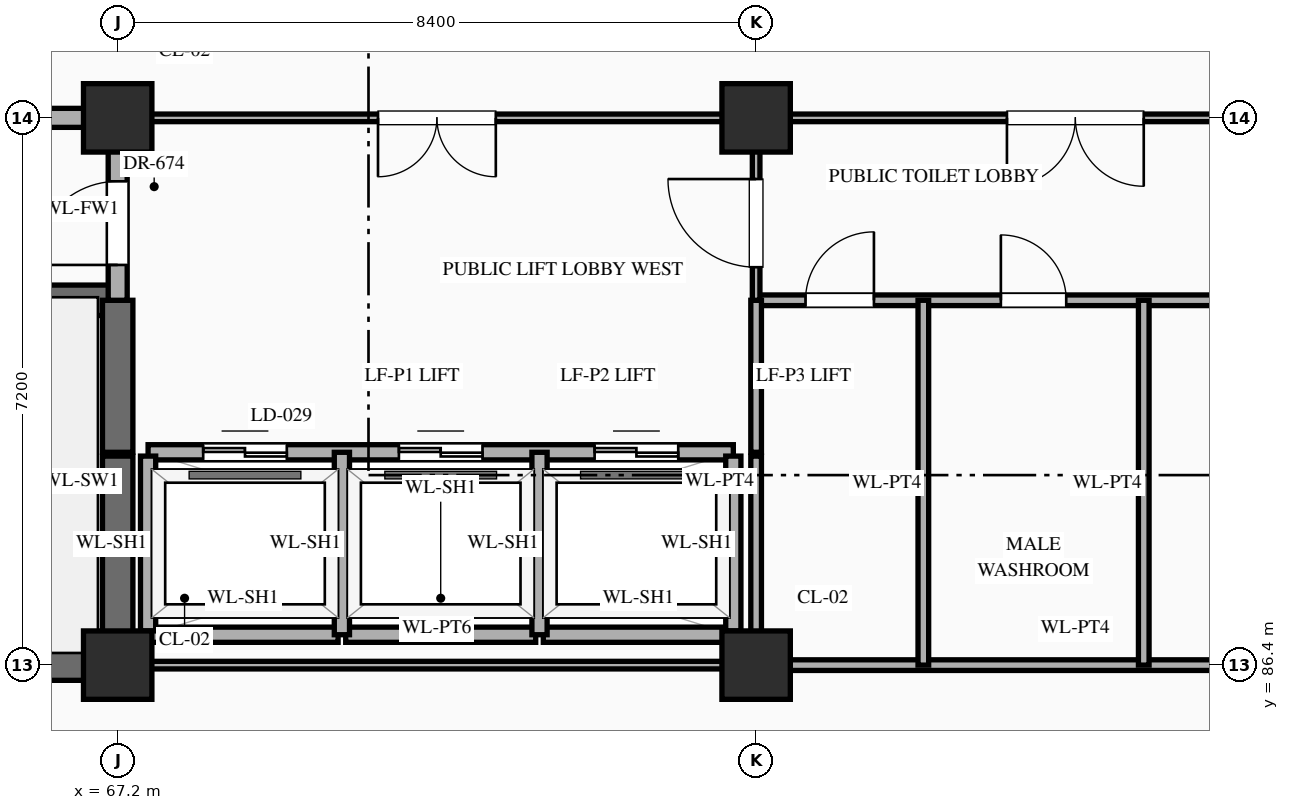
"""IFC4 building model, lengths in metres.
Left out: names, types, materials, properties, quantities, classifications, styles, units other than length and angle.
Written with IfcOpenShell. Run it as: python <this file> out.ifc"""

import sys

from ifc_helpers import new_model, si_unit, direction, frame, frame_2d, origin, origin_2d, place, context, subcontext, project, spatial, rectangle, extrude, element, fill, save


model = new_model("IFC4")
c1 = context("Model", 3, precision=1e-05, world=origin(), true_north=direction((0.0, 1.0)))
c2 = subcontext(c1, "Body", "Model", "MODEL_VIEW")
j1 = project(units=[si_unit("LENGTHUNIT", "METRE"), si_unit("PLANEANGLEUNIT", "RADIAN")], contexts=[c1])
p1 = place(None, origin())
s1 = spatial("IfcSite", under=j1, at=p1, CompositionType="ELEMENT")
p2 = place(p1, origin())
s2 = spatial("IfcBuilding", under=s1, at=p2, CompositionType="ELEMENT")
p3 = place(p2, origin())
s3 = spatial("IfcBuildingStorey", under=s2, at=p3, CompositionType="ELEMENT", Elevation=0.0)
for number, where, z_axis, x_axis in (
    (1, (67.2, 86.4, 0.0), (0.0, 0.0, 1.0), (1.0, 0.0, 0.0)),
    (2, (67.2, 93.6, 0.0), (0.0, 0.0, 1.0), (1.0, 0.0, 0.0)),
    (3, (75.6, 86.4, 0.0), (0.0, 0.0, 1.0), (1.0, 0.0, 0.0)),
    (4, (75.6, 93.6, 0.0), (0.0, 0.0, 1.0), (1.0, 0.0, 0.0)),
):
    element("IfcColumn", number, at=place(p3, frame(where, z_axis=z_axis, x_axis=x_axis)), inside=s3, PredefinedType="COLUMN", context=c2, shape_type="SweptSolid", body=[
        extrude(rectangle(XDim=0.9, YDim=0.9, at=origin_2d()), origin(), (0.0, 0.0, 1.0), 5.4),
    ])
p4 = place(p3, frame((58.8, 86.4, 0.0), z_axis=(0.0, 0.0, 1.0), x_axis=(1.0, 0.0, 0.0)))
e5 = element("IfcWall", 5, at=p4, inside=s3, PredefinedType="SHEAR", context=c2, shape_type="SweptSolid", body=[
    extrude(rectangle(XDim=8.4, YDim=0.4, at=frame_2d((4.2, 0.0))), origin(), (0.0, 0.0, 1.0), 5.12),
])
p5 = place(p3, frame((67.25, 86.4, 0.0), z_axis=(0.0, 0.0, 1.0), x_axis=(1.0, 0.0, 0.0)))
e6 = element("IfcWall", 6, at=p5, inside=s3, PredefinedType="STANDARD", context=c2, shape_type="SweptSolid", body=[
    extrude(rectangle(XDim=8.3, YDim=0.1, at=frame_2d((4.15, 0.0))), origin(), (0.0, 0.0, 1.0), 4.27),
])
p6 = place(p3, frame((75.6, 86.4, 0.0), z_axis=(0.0, 0.0, 1.0), x_axis=(1.0, 0.0, 0.0)))
e7 = element("IfcWall", 7, at=p6, inside=s3, PredefinedType="STANDARD", context=c2, shape_type="SweptSolid", body=[
    extrude(rectangle(XDim=8.4, YDim=0.14, at=frame_2d((4.2, 0.0))), origin(), (0.0, 0.0, 1.0), 4.27),
])
for number, where, z_axis, x_axis in (
    (8, (67.6, 86.8, 0.0), (0.0, 0.0, 1.0), (1.0, 0.0, 0.0)),
    (9, (70.2, 86.8, 0.0), (0.0, 0.0, 1.0), (1.0, 0.0, 0.0)),
    (10, (72.8, 86.8, 0.0), (0.0, 0.0, 1.0), (1.0, 0.0, 0.0)),
):
    element("IfcWall", number, at=place(p3, frame(where, z_axis=z_axis, x_axis=x_axis)), inside=s3, PredefinedType="STANDARD", context=c2, shape_type="SweptSolid", body=[
        extrude(rectangle(XDim=2.5, YDim=0.2, at=frame_2d((1.25, 0.0))), origin(), (0.0, 0.0, 1.0), 5.12),
    ])
p7 = place(p3, frame((67.6, 89.2, 0.0), z_axis=(0.0, 0.0, 1.0), x_axis=(1.0, 0.0, 0.0)))
e11 = element("IfcWall", 11, at=p7, inside=s3, PredefinedType="STANDARD", context=c2, shape_type="SweptSolid", body=[
    extrude(rectangle(XDim=7.7, YDim=0.2, at=frame_2d((3.85, 0.0))), origin(), (0.0, 0.0, 1.0), 5.12),
])
p8 = place(p7, frame((0.725, 0.0, 0.0)))
e12 = element("IfcOpeningElement", 12, at=p8, cuts=e11, PredefinedType="OPENING", context=c2, shape_type="SweptSolid", body=[
    extrude(rectangle(XDim=1.1, YDim=2.15, at=frame_2d((0.55, 1.075))), frame((0.0, 0.112, 0.0), z_axis=(0.0, -1.0, 0.0), x_axis=(1.0, 0.0, 0.0)), (0.0, 0.0, 1.0), 0.224),
])
p9 = place(p7, frame((3.3, 0.0, 0.0)))
e13 = element("IfcOpeningElement", 13, at=p9, cuts=e11, PredefinedType="OPENING", context=c2, shape_type="SweptSolid", body=[
    extrude(rectangle(XDim=1.1, YDim=2.15, at=frame_2d((0.55, 1.075))), frame((0.0, 0.112, 0.0), z_axis=(0.0, -1.0, 0.0), x_axis=(1.0, 0.0, 0.0)), (0.0, 0.0, 1.0), 0.224),
])
p10 = place(p7, frame((5.875, 0.0, 0.0)))
e14 = element("IfcOpeningElement", 14, at=p10, cuts=e11, PredefinedType="OPENING", context=c2, shape_type="SweptSolid", body=[
    extrude(rectangle(XDim=1.1, YDim=2.15, at=frame_2d((0.55, 1.075))), frame((0.0, 0.112, 0.0), z_axis=(0.0, -1.0, 0.0), x_axis=(1.0, 0.0, 0.0)), (0.0, 0.0, 1.0), 0.224),
])
p11 = place(p3, frame((58.8, 91.2, 0.0), z_axis=(0.0, 0.0, 1.0), x_axis=(1.0, 0.0, 0.0)))
e15 = element("IfcWall", 15, at=p11, inside=s3, PredefinedType="SHEAR", context=c2, shape_type="SweptSolid", body=[
    extrude(rectangle(XDim=8.4, YDim=0.4, at=frame_2d((4.2, 0.0))), origin(), (0.0, 0.0, 1.0), 5.12),
])
p12 = place(p11, frame((0.65, 0.0, 0.0)))
e16 = element("IfcOpeningElement", 16, at=p12, cuts=e15, PredefinedType="OPENING", context=c2, shape_type="SweptSolid", body=[
    extrude(rectangle(XDim=1.1, YDim=2.2, at=frame_2d((0.55, 1.1))), frame((0.0, 0.212, 0.0), z_axis=(0.0, -1.0, 0.0), x_axis=(1.0, 0.0, 0.0)), (0.0, 0.0, 1.0), 0.424),
])
p13 = place(p3, frame((75.6, 91.2, 0.0), z_axis=(0.0, 0.0, 1.0), x_axis=(1.0, 0.0, 0.0)))
e17 = element("IfcWall", 17, at=p13, inside=s3, PredefinedType="STANDARD", context=c2, shape_type="SweptSolid", body=[
    extrude(rectangle(XDim=8.4, YDim=0.14, at=frame_2d((4.2, 0.0))), origin(), (0.0, 0.0, 1.0), 5.12),
])
p14 = place(p13, frame((0.65, 0.0, 0.0)))
e18 = element("IfcOpeningElement", 18, at=p14, cuts=e17, PredefinedType="OPENING", context=c2, shape_type="SweptSolid", body=[
    extrude(rectangle(XDim=0.9, YDim=2.15, at=frame_2d((0.45, 1.075))), frame((0.0, 0.082, 0.0), z_axis=(0.0, -1.0, 0.0), x_axis=(1.0, 0.0, 0.0)), (0.0, 0.0, 1.0), 0.164),
])
p15 = place(p13, frame((3.22, 0.0, 0.0)))
e19 = element("IfcOpeningElement", 19, at=p15, cuts=e17, PredefinedType="OPENING", context=c2, shape_type="SweptSolid", body=[
    extrude(rectangle(XDim=0.86, YDim=2.1, at=frame_2d((0.43, 1.05))), frame((0.0, 0.082, 0.0), z_axis=(0.0, -1.0, 0.0), x_axis=(1.0, 0.0, 0.0)), (0.0, 0.0, 1.0), 0.164),
])
p16 = place(p13, frame((6.32, 0.0, 0.0)))
e20 = element("IfcOpeningElement", 20, at=p16, cuts=e17, PredefinedType="OPENING", context=c2, shape_type="SweptSolid", body=[
    extrude(rectangle(XDim=0.86, YDim=2.1, at=frame_2d((0.43, 1.05))), frame((0.0, 0.082, 0.0), z_axis=(0.0, -1.0, 0.0), x_axis=(1.0, 0.0, 0.0)), (0.0, 0.0, 1.0), 0.164),
])
p17 = place(p3, frame((42.0, 93.6, 0.0), z_axis=(0.0, 0.0, 1.0), x_axis=(1.0, 0.0, 0.0)))
e21 = element("IfcWall", 21, at=p17, inside=s3, PredefinedType="STANDARD", context=c2, shape_type="SweptSolid", body=[
    extrude(rectangle(XDim=25.2, YDim=0.25, at=frame_2d((12.6, 0.0))), origin(), (0.0, 0.0, 1.0), 4.27),
])
p18 = place(p17, frame((20.2, 0.0, 0.0)))
e22 = element("IfcOpeningElement", 22, at=p18, cuts=e21, PredefinedType="OPENING", context=c2, shape_type="SweptSolid", body=[
    extrude(rectangle(XDim=1.6, YDim=2.3, at=frame_2d((0.8, 1.15))), frame((0.0, 0.137, 0.0), z_axis=(0.0, -1.0, 0.0), x_axis=(1.0, 0.0, 0.0)), (0.0, 0.0, 1.0), 0.274),
])
p19 = place(p17, frame((3.288, 0.0, 0.0)))
e23 = element("IfcOpeningElement", 23, at=p19, cuts=e21, PredefinedType="OPENING", context=c2, shape_type="SweptSolid", body=[
    extrude(rectangle(XDim=1.8, YDim=2.35, at=frame_2d((0.9, 1.175))), frame((0.0, 0.137, 0.0), z_axis=(0.0, -1.0, 0.0), x_axis=(1.0, 0.0, 0.0)), (0.0, 0.0, 1.0), 0.274),
])
p20 = place(p17, frame((8.985, 0.0, 0.0)))
e24 = element("IfcOpeningElement", 24, at=p20, cuts=e21, PredefinedType="OPENING", context=c2, shape_type="SweptSolid", body=[
    extrude(rectangle(XDim=2.0, YDim=2.4, at=frame_2d((1.0, 1.2))), frame((0.0, 0.137, 0.0), z_axis=(0.0, -1.0, 0.0), x_axis=(1.0, 0.0, 0.0)), (0.0, 0.0, 1.0), 0.274),
])
p21 = place(p17, frame((12.125, 0.0, 0.0)))
e25 = element("IfcOpeningElement", 25, at=p21, cuts=e21, PredefinedType="OPENING", context=c2, shape_type="SweptSolid", body=[
    extrude(rectangle(XDim=0.95, YDim=2.15, at=frame_2d((0.475, 1.075))), frame((0.0, 0.137, 0.0), z_axis=(0.0, -1.0, 0.0), x_axis=(1.0, 0.0, 0.0)), (0.0, 0.0, 1.0), 0.274),
])
p22 = place(p17, frame((14.665, 0.0, 0.0)))
e26 = element("IfcOpeningElement", 26, at=p22, cuts=e21, PredefinedType="OPENING", context=c2, shape_type="SweptSolid", body=[
    extrude(rectangle(XDim=1.1, YDim=2.2, at=frame_2d((0.55, 1.1))), frame((0.0, 0.137, 0.0), z_axis=(0.0, -1.0, 0.0), x_axis=(1.0, 0.0, 0.0)), (0.0, 0.0, 1.0), 0.274),
])
p23 = place(p3, frame((67.2, 93.6, 0.0), z_axis=(0.0, 0.0, 1.0), x_axis=(1.0, 0.0, 0.0)))
e27 = element("IfcWall", 27, at=p23, inside=s3, PredefinedType="STANDARD", context=c2, shape_type="SweptSolid", body=[
    extrude(rectangle(XDim=33.6, YDim=0.1, at=frame_2d((16.8, 0.0))), origin(), (0.0, 0.0, 1.0), 4.27),
])
p24 = place(p23, frame((3.425, 0.0, 0.0)))
e28 = element("IfcOpeningElement", 28, at=p24, cuts=e27, PredefinedType="OPENING", context=c2, shape_type="SweptSolid", body=[
    extrude(rectangle(XDim=1.55, YDim=2.35, at=frame_2d((0.775, 1.175))), frame((0.0, 0.062, 0.0), z_axis=(0.0, -1.0, 0.0), x_axis=(1.0, 0.0, 0.0)), (0.0, 0.0, 1.0), 0.124),
])
p25 = place(p23, frame((28.55, 0.0, 0.0)))
e29 = element("IfcOpeningElement", 29, at=p25, cuts=e27, PredefinedType="OPENING", context=c2, shape_type="SweptSolid", body=[
    extrude(rectangle(XDim=1.7, YDim=2.45, at=frame_2d((0.85, 1.225))), frame((0.0, 0.062, 0.0), z_axis=(0.0, -1.0, 0.0), x_axis=(1.0, 0.0, 0.0)), (0.0, 0.0, 1.0), 0.124),
])
p26 = place(p23, frame((11.7, 0.0, 0.0)))
e30 = element("IfcOpeningElement", 30, at=p26, cuts=e27, PredefinedType="OPENING", context=c2, shape_type="SweptSolid", body=[
    extrude(rectangle(XDim=1.8, YDim=2.5, at=frame_2d((0.9, 1.25))), frame((0.0, 0.062, 0.0), z_axis=(0.0, -1.0, 0.0), x_axis=(1.0, 0.0, 0.0)), (0.0, 0.0, 1.0), 0.124),
])
p27 = place(p23, frame((17.885, 0.0, 0.0)))
e31 = element("IfcOpeningElement", 31, at=p27, cuts=e27, PredefinedType="OPENING", context=c2, shape_type="SweptSolid", body=[
    extrude(rectangle(XDim=1.0, YDim=2.25, at=frame_2d((0.5, 1.125))), frame((0.0, 0.062, 0.0), z_axis=(0.0, -1.0, 0.0), x_axis=(1.0, 0.0, 0.0)), (0.0, 0.0, 1.0), 0.124),
])
p28 = place(p23, frame((20.48, 0.0, 0.0)))
e32 = element("IfcOpeningElement", 32, at=p28, cuts=e27, PredefinedType="OPENING", context=c2, shape_type="SweptSolid", body=[
    extrude(rectangle(XDim=1.04, YDim=2.2, at=frame_2d((0.52, 1.1))), frame((0.0, 0.062, 0.0), z_axis=(0.0, -1.0, 0.0), x_axis=(1.0, 0.0, 0.0)), (0.0, 0.0, 1.0), 0.124),
])
p29 = place(p23, frame((23.075, 0.0, 0.0)))
e33 = element("IfcOpeningElement", 33, at=p29, cuts=e27, PredefinedType="OPENING", context=c2, shape_type="SweptSolid", body=[
    extrude(rectangle(XDim=1.08, YDim=2.25, at=frame_2d((0.54, 1.125))), frame((0.0, 0.062, 0.0), z_axis=(0.0, -1.0, 0.0), x_axis=(1.0, 0.0, 0.0)), (0.0, 0.0, 1.0), 0.124),
])
p30 = place(p3, frame((67.2, 86.45, 0.0), z_axis=(0.0, 0.0, 1.0), x_axis=(0.0, 1.0, 0.0)))
e34 = element("IfcWall", 34, at=p30, inside=s3, PredefinedType="SHEAR", context=c2, shape_type="SweptSolid", body=[
    extrude(rectangle(XDim=2.7, YDim=0.4, at=frame_2d((1.35, 0.0))), origin(), (0.0, 0.0, 1.0), 5.12),
])
p31 = place(p3, frame((67.2, 89.2, 0.0), z_axis=(0.0, 0.0, 1.0), x_axis=(0.0, 1.0, 0.0)))
e35 = element("IfcWall", 35, at=p31, inside=s3, PredefinedType="SHEAR", context=c2, shape_type="SweptSolid", body=[
    extrude(rectangle(XDim=2.0, YDim=0.4, at=frame_2d((1.0, 0.0))), origin(), (0.0, 0.0, 1.0), 5.12),
])
p32 = place(p3, frame((67.2, 91.2, 0.0), z_axis=(0.0, 0.0, 1.0), x_axis=(0.0, 1.0, 0.0)))
e36 = element("IfcWall", 36, at=p32, inside=s3, PredefinedType="STANDARD", context=c2, shape_type="SweptSolid", body=[
    extrude(rectangle(XDim=2.4, YDim=0.25, at=frame_2d((1.2, 0.0))), origin(), (0.0, 0.0, 1.0), 4.37),
])
p33 = place(p32, frame((0.465, 0.0, 0.0)))
e37 = element("IfcOpeningElement", 37, at=p33, cuts=e36, PredefinedType="OPENING", context=c2, shape_type="SweptSolid", body=[
    extrude(rectangle(XDim=1.1, YDim=2.2, at=frame_2d((0.55, 1.1))), frame((0.0, 0.137, 0.0), z_axis=(0.0, -1.0, 0.0), x_axis=(1.0, 0.0, 0.0)), (0.0, 0.0, 1.0), 0.274),
])
p34 = place(p3, frame((67.6, 86.85, 0.0), z_axis=(0.0, 0.0, 1.0), x_axis=(0.0, 1.0, 0.0)))
e38 = element("IfcWall", 38, at=p34, inside=s3, PredefinedType="STANDARD", context=c2, shape_type="SweptSolid", body=[
    extrude(rectangle(XDim=2.3, YDim=0.2, at=frame_2d((1.15, 0.0))), origin(), (0.0, 0.0, 1.0), 5.12),
])
for number, where, z_axis, x_axis in (
    (39, (70.15, 86.8, 0.0), (0.0, 0.0, 1.0), (0.0, 1.0, 0.0)),
    (40, (72.75, 86.8, 0.0), (0.0, 0.0, 1.0), (0.0, 1.0, 0.0)),
):
    element("IfcWall", number, at=place(p3, frame(where, z_axis=z_axis, x_axis=x_axis)), inside=s3, PredefinedType="STANDARD", context=c2, shape_type="SweptSolid", body=[
        extrude(rectangle(XDim=2.4, YDim=0.2, at=frame_2d((1.2, 0.0))), origin(), (0.0, 0.0, 1.0), 5.12),
    ])
p35 = place(p3, frame((75.3, 86.85, 0.0), z_axis=(0.0, 0.0, 1.0), x_axis=(0.0, 1.0, 0.0)))
e41 = element("IfcWall", 41, at=p35, inside=s3, PredefinedType="STANDARD", context=c2, shape_type="SweptSolid", body=[
    extrude(rectangle(XDim=2.3, YDim=0.2, at=frame_2d((1.15, 0.0))), origin(), (0.0, 0.0, 1.0), 5.12),
])
p36 = place(p3, frame((75.6, 86.45, 0.0), z_axis=(0.0, 0.0, 1.0), x_axis=(0.0, 1.0, 0.0)))
e42 = element("IfcWall", 42, at=p36, inside=s3, PredefinedType="STANDARD", context=c2, shape_type="SweptSolid", body=[
    extrude(rectangle(XDim=2.7, YDim=0.14, at=frame_2d((1.35, 0.0))), origin(), (0.0, 0.0, 1.0), 4.37),
])
p37 = place(p3, frame((75.6, 89.2, 0.0), z_axis=(0.0, 0.0, 1.0), x_axis=(0.0, 1.0, 0.0)))
e43 = element("IfcWall", 43, at=p37, inside=s3, PredefinedType="STANDARD", context=c2, shape_type="SweptSolid", body=[
    extrude(rectangle(XDim=2.0, YDim=0.14, at=frame_2d((1.0, 0.0))), origin(), (0.0, 0.0, 1.0), 4.37),
])
p38 = place(p3, frame((75.6, 91.2, 0.0), z_axis=(0.0, 0.0, 1.0), x_axis=(0.0, 1.0, 0.0)))
e44 = element("IfcWall", 44, at=p38, inside=s3, PredefinedType="STANDARD", context=c2, shape_type="SweptSolid", body=[
    extrude(rectangle(XDim=2.4, YDim=0.1, at=frame_2d((1.2, 0.0))), origin(), (0.0, 0.0, 1.0), 4.37),
])
p39 = place(p38, frame((0.435, 0.0, 0.0)))
e45 = element("IfcOpeningElement", 45, at=p39, cuts=e44, PredefinedType="OPENING", context=c2, shape_type="SweptSolid", body=[
    extrude(rectangle(XDim=1.16, YDim=2.3, at=frame_2d((0.58, 1.15))), frame((0.0, 0.062, 0.0), z_axis=(0.0, -1.0, 0.0), x_axis=(1.0, 0.0, 0.0)), (0.0, 0.0, 1.0), 0.124),
])
for number, where, z_axis, x_axis in (
    (46, (77.8, 86.4, 0.0), (0.0, 0.0, 1.0), (0.0, 1.0, 0.0)),
    (47, (80.7, 86.4, 0.0), (0.0, 0.0, 1.0), (0.0, 1.0, 0.0)),
):
    element("IfcWall", number, at=place(p3, frame(where, z_axis=z_axis, x_axis=x_axis)), inside=s3, PredefinedType="STANDARD", context=c2, shape_type="SweptSolid", body=[
        extrude(rectangle(XDim=4.8, YDim=0.14, at=frame_2d((2.4, 0.0))), origin(), (0.0, 0.0, 1.0), 5.12),
    ])
p40 = place(p8, origin())
e48 = element("IfcDoor", 48, at=p40, inside=s3, OperationType="DOUBLE_DOOR_SLIDING", PredefinedType="DOOR", context=c2, shape_type="SweptSolid", body=[
    extrude(rectangle(XDim=1.1, YDim=2.15, at=frame_2d((0.55, 1.075))), frame((0.0, 0.025, 0.0), z_axis=(0.0, -1.0, 0.0), x_axis=(1.0, 0.0, 0.0)), (0.0, 0.0, 1.0), 0.05),
])
fill(e12, e48)
p41 = place(p9, origin())
e49 = element("IfcDoor", 49, at=p41, inside=s3, OperationType="DOUBLE_DOOR_SLIDING", PredefinedType="DOOR", context=c2, shape_type="SweptSolid", body=[
    extrude(rectangle(XDim=1.1, YDim=2.15, at=frame_2d((0.55, 1.075))), frame((0.0, 0.025, 0.0), z_axis=(0.0, -1.0, 0.0), x_axis=(1.0, 0.0, 0.0)), (0.0, 0.0, 1.0), 0.05),
])
fill(e13, e49)
p42 = place(p10, origin())
e50 = element("IfcDoor", 50, at=p42, inside=s3, OperationType="DOUBLE_DOOR_SLIDING", PredefinedType="DOOR", context=c2, shape_type="SweptSolid", body=[
    extrude(rectangle(XDim=1.1, YDim=2.15, at=frame_2d((0.55, 1.075))), frame((0.0, 0.025, 0.0), z_axis=(0.0, -1.0, 0.0), x_axis=(1.0, 0.0, 0.0)), (0.0, 0.0, 1.0), 0.05),
])
fill(e14, e50)
p43 = place(p33, origin())
e51 = element("IfcDoor", 51, at=p43, inside=s3, OperationType="SINGLE_SWING_LEFT", PredefinedType="DOOR", context=c2, shape_type="SweptSolid", body=[
    extrude(rectangle(XDim=1.1, YDim=2.2, at=frame_2d((0.55, 1.1))), frame((0.0, 0.025, 0.0), z_axis=(0.0, -1.0, 0.0), x_axis=(1.0, 0.0, 0.0)), (0.0, 0.0, 1.0), 0.05),
])
fill(e37, e51)
p44 = place(p39, origin())
e52 = element("IfcDoor", 52, at=p44, inside=s3, OperationType="SINGLE_SWING_RIGHT", PredefinedType="DOOR", context=c2, shape_type="SweptSolid", body=[
    extrude(rectangle(XDim=1.16, YDim=2.3, at=frame_2d((0.58, 1.15))), frame((0.0, 0.025, 0.0), z_axis=(0.0, -1.0, 0.0), x_axis=(1.0, 0.0, 0.0)), (0.0, 0.0, 1.0), 0.05),
])
fill(e45, e52)
p45 = place(p24, frame((1.55, 0.0, 0.0), z_axis=(0.0, 0.0, 1.0), x_axis=(-1.0, 0.0, 0.0)))
e53 = element("IfcDoor", 53, at=p45, inside=s3, OperationType="DOUBLE_DOOR_SINGLE_SWING", PredefinedType="DOOR", context=c2, shape_type="SweptSolid", body=[
    extrude(rectangle(XDim=1.55, YDim=2.35, at=frame_2d((0.775, 1.175))), frame((0.0, 0.025, 0.0), z_axis=(0.0, -1.0, 0.0), x_axis=(1.0, 0.0, 0.0)), (0.0, 0.0, 1.0), 0.05),
])
fill(e28, e53)
p46 = place(p14, origin())
e54 = element("IfcDoor", 54, at=p46, inside=s3, OperationType="SINGLE_SWING_RIGHT", PredefinedType="DOOR", context=c2, shape_type="SweptSolid", body=[
    extrude(rectangle(XDim=0.9, YDim=2.15, at=frame_2d((0.45, 1.075))), frame((0.0, 0.025, 0.0), z_axis=(0.0, -1.0, 0.0), x_axis=(1.0, 0.0, 0.0)), (0.0, 0.0, 1.0), 0.05),
])
fill(e18, e54)
p47 = place(p15, origin())
e55 = element("IfcDoor", 55, at=p47, inside=s3, OperationType="SINGLE_SWING_LEFT", PredefinedType="DOOR", context=c2, shape_type="SweptSolid", body=[
    extrude(rectangle(XDim=0.86, YDim=2.1, at=frame_2d((0.43, 1.05))), frame((0.0, 0.025, 0.0), z_axis=(0.0, -1.0, 0.0), x_axis=(1.0, 0.0, 0.0)), (0.0, 0.0, 1.0), 0.05),
])
fill(e19, e55)
p48 = place(p26, frame((1.8, 0.0, 0.0), z_axis=(0.0, 0.0, 1.0), x_axis=(-1.0, 0.0, 0.0)))
e56 = element("IfcDoor", 56, at=p48, inside=s3, OperationType="DOUBLE_DOOR_SINGLE_SWING", PredefinedType="DOOR", context=c2, shape_type="SweptSolid", body=[
    extrude(rectangle(XDim=1.8, YDim=2.5, at=frame_2d((0.9, 1.25))), frame((0.0, 0.025, 0.0), z_axis=(0.0, -1.0, 0.0), x_axis=(1.0, 0.0, 0.0)), (0.0, 0.0, 1.0), 0.05),
])
fill(e30, e56)
save(model, sys.argv[1])
